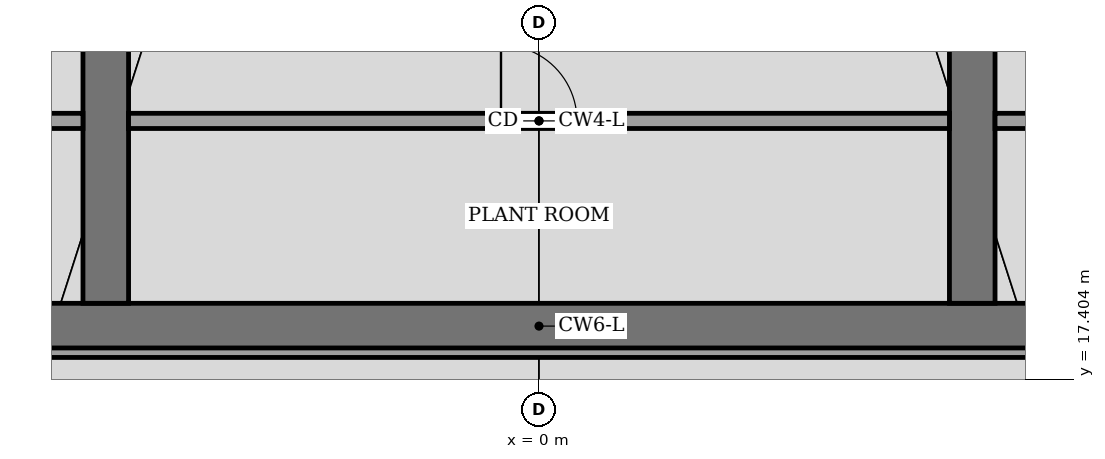
"""IFC4 building model, lengths in metres.
Left out: names, types, materials, properties, quantities, classifications, styles, units other than length and angle.
Written with IfcOpenShell. Run it as: python <this file> out.ifc"""

import sys

from ifc_helpers import new_model, si_unit, direction, frame, frame_2d, origin, place, context, subcontext, project, spatial, rectangle, extrude, element, fill, save


model = new_model("IFC4")
c1 = context("Model", 3, precision=1e-05, world=origin(), true_north=direction((0.0, 1.0)))
c2 = subcontext(c1, "Body", "Model", "MODEL_VIEW")
j1 = project(units=[si_unit("LENGTHUNIT", "METRE"), si_unit("PLANEANGLEUNIT", "RADIAN")], contexts=[c1])
p1 = place(None, origin())
s1 = spatial("IfcSite", under=j1, at=p1, CompositionType="ELEMENT")
p2 = place(p1, origin())
s2 = spatial("IfcBuilding", under=s1, at=p2, CompositionType="ELEMENT")
p3 = place(p2, frame((0.0, 0.0, 368.0)))
s3 = spatial("IfcBuildingStorey", under=s2, at=p3, CompositionType="ELEMENT", Elevation=368.0)
p4 = place(p3, frame((-13.2, 18.1, -0.15), z_axis=(0.0, 0.0, 1.0), x_axis=(1.0, 0.0, 0.0)))
e1 = element("IfcWall", 1, at=p4, inside=s3, PredefinedType="SHEAR", context=c2, shape_type="SweptSolid", body=[
    extrude(rectangle(XDim=26.4, YDim=0.6, at=frame_2d((13.2, 0.0))), origin(), (0.0, 0.0, 1.0), 3.45),
])
p5 = place(p3, frame((-5.7, 18.4, -0.15), z_axis=(0.0, 0.0, 1.0), x_axis=(0.0, 1.0, 0.0)))
e2 = element("IfcWall", 2, at=p5, inside=s3, PredefinedType="SHEAR", context=c2, shape_type="SweptSolid", body=[
    extrude(rectangle(XDim=19.2, YDim=0.6, at=frame_2d((9.6, 0.0))), origin(), (0.0, 0.0, 1.0), 3.45),
])
p6 = place(p5, frame((8.35, 0.0, 0.15)))
e3 = element("IfcOpeningElement", 3, at=p6, cuts=e2, PredefinedType="OPENING", context=c2, shape_type="SweptSolid", body=[
    extrude(rectangle(XDim=0.9, YDim=2.1, at=frame_2d((0.45, 1.05))), frame((0.0, 0.31, 0.0), z_axis=(0.0, -1.0, 0.0), x_axis=(1.0, 0.0, 0.0)), (0.0, 0.0, 1.0), 0.62),
])
p7 = place(p3, frame((5.7, 18.4, -0.15), z_axis=(0.0, 0.0, 1.0), x_axis=(0.0, 1.0, 0.0)))
e4 = element("IfcWall", 4, at=p7, inside=s3, PredefinedType="SHEAR", context=c2, shape_type="SweptSolid", body=[
    extrude(rectangle(XDim=19.2, YDim=0.6, at=frame_2d((9.6, 0.0))), origin(), (0.0, 0.0, 1.0), 3.45),
])
p8 = place(p7, frame((13.3, 0.0, 0.15)))
e5 = element("IfcOpeningElement", 5, at=p8, cuts=e4, PredefinedType="OPENING", context=c2, shape_type="SweptSolid", body=[
    extrude(rectangle(XDim=2.4, YDim=2.4, at=frame_2d((1.2, 1.2))), frame((0.0, 0.31, 0.0), z_axis=(0.0, -1.0, 0.0), x_axis=(1.0, 0.0, 0.0)), (0.0, 0.0, 1.0), 0.62),
])
p9 = place(p3, frame((-12.6, 20.8, 0.0), z_axis=(0.0, 0.0, 1.0), x_axis=(1.0, 0.0, 0.0)))
e6 = element("IfcWall", 6, at=p9, inside=s3, PredefinedType="PARTITIONING", context=c2, shape_type="SweptSolid", body=[
    extrude(rectangle(XDim=6.6, YDim=0.2, at=frame_2d((3.3, 0.0))), origin(), (0.0, 0.0, 1.0), 3.3),
])
p10 = place(p9, frame((2.8, 0.0, 0.0)))
e7 = element("IfcOpeningElement", 7, at=p10, cuts=e6, PredefinedType="OPENING", context=c2, shape_type="SweptSolid", body=[
    extrude(rectangle(XDim=1.0, YDim=2.1, at=frame_2d((0.5, 1.05))), frame((0.0, 0.11, 0.0), z_axis=(0.0, -1.0, 0.0), x_axis=(1.0, 0.0, 0.0)), (0.0, 0.0, 1.0), 0.22),
])
p11 = place(p3, frame((-5.4, 20.8, 0.0), z_axis=(0.0, 0.0, 1.0), x_axis=(1.0, 0.0, 0.0)))
e8 = element("IfcWall", 8, at=p11, inside=s3, PredefinedType="PARTITIONING", context=c2, shape_type="SweptSolid", body=[
    extrude(rectangle(XDim=10.8, YDim=0.2, at=frame_2d((5.4, 0.0))), origin(), (0.0, 0.0, 1.0), 3.3),
])
p12 = place(p11, frame((4.9, 0.0, 0.0)))
e9 = element("IfcOpeningElement", 9, at=p12, cuts=e8, PredefinedType="OPENING", context=c2, shape_type="SweptSolid", body=[
    extrude(rectangle(XDim=1.0, YDim=2.1, at=frame_2d((0.5, 1.05))), frame((0.0, 0.11, 0.0), z_axis=(0.0, -1.0, 0.0), x_axis=(1.0, 0.0, 0.0)), (0.0, 0.0, 1.0), 0.22),
])
p13 = place(p3, frame((6.0, 20.8, 0.0), z_axis=(0.0, 0.0, 1.0), x_axis=(1.0, 0.0, 0.0)))
e10 = element("IfcWall", 10, at=p13, inside=s3, PredefinedType="PARTITIONING", context=c2, shape_type="SweptSolid", body=[
    extrude(rectangle(XDim=6.6, YDim=0.2, at=frame_2d((3.3, 0.0))), origin(), (0.0, 0.0, 1.0), 3.3),
])
p14 = place(p13, frame((2.8, 0.0, 0.0)))
e11 = element("IfcOpeningElement", 11, at=p14, cuts=e10, PredefinedType="OPENING", context=c2, shape_type="SweptSolid", body=[
    extrude(rectangle(XDim=1.0, YDim=2.1, at=frame_2d((0.5, 1.05))), frame((0.0, 0.11, 0.0), z_axis=(0.0, -1.0, 0.0), x_axis=(1.0, 0.0, 0.0)), (0.0, 0.0, 1.0), 0.22),
])
p15 = place(p3, frame((-13.2, 17.75, 0.0), z_axis=(0.0, 0.0, 1.0), x_axis=(1.0, 0.0, 0.0)))
e12 = element("IfcWall", 12, at=p15, inside=s3, PredefinedType="PARTITIONING", context=c2, shape_type="SweptSolid", body=[
    extrude(rectangle(XDim=26.4, YDim=0.125, at=frame_2d((13.2, 0.0))), origin(), (0.0, 0.0, 1.0), 2.97),
])
p16 = place(p12, origin())
e13 = element("IfcDoor", 13, at=p16, inside=s3, OperationType="SINGLE_SWING_LEFT", PredefinedType="DOOR", context=c2, shape_type="SweptSolid", body=[
    extrude(rectangle(XDim=1.0, YDim=2.1, at=frame_2d((0.5, 1.05))), frame((0.0, 0.025, 0.0), z_axis=(0.0, -1.0, 0.0), x_axis=(1.0, 0.0, 0.0)), (0.0, 0.0, 1.0), 0.05),
])
fill(e9, e13)
save(model, sys.argv[1])
